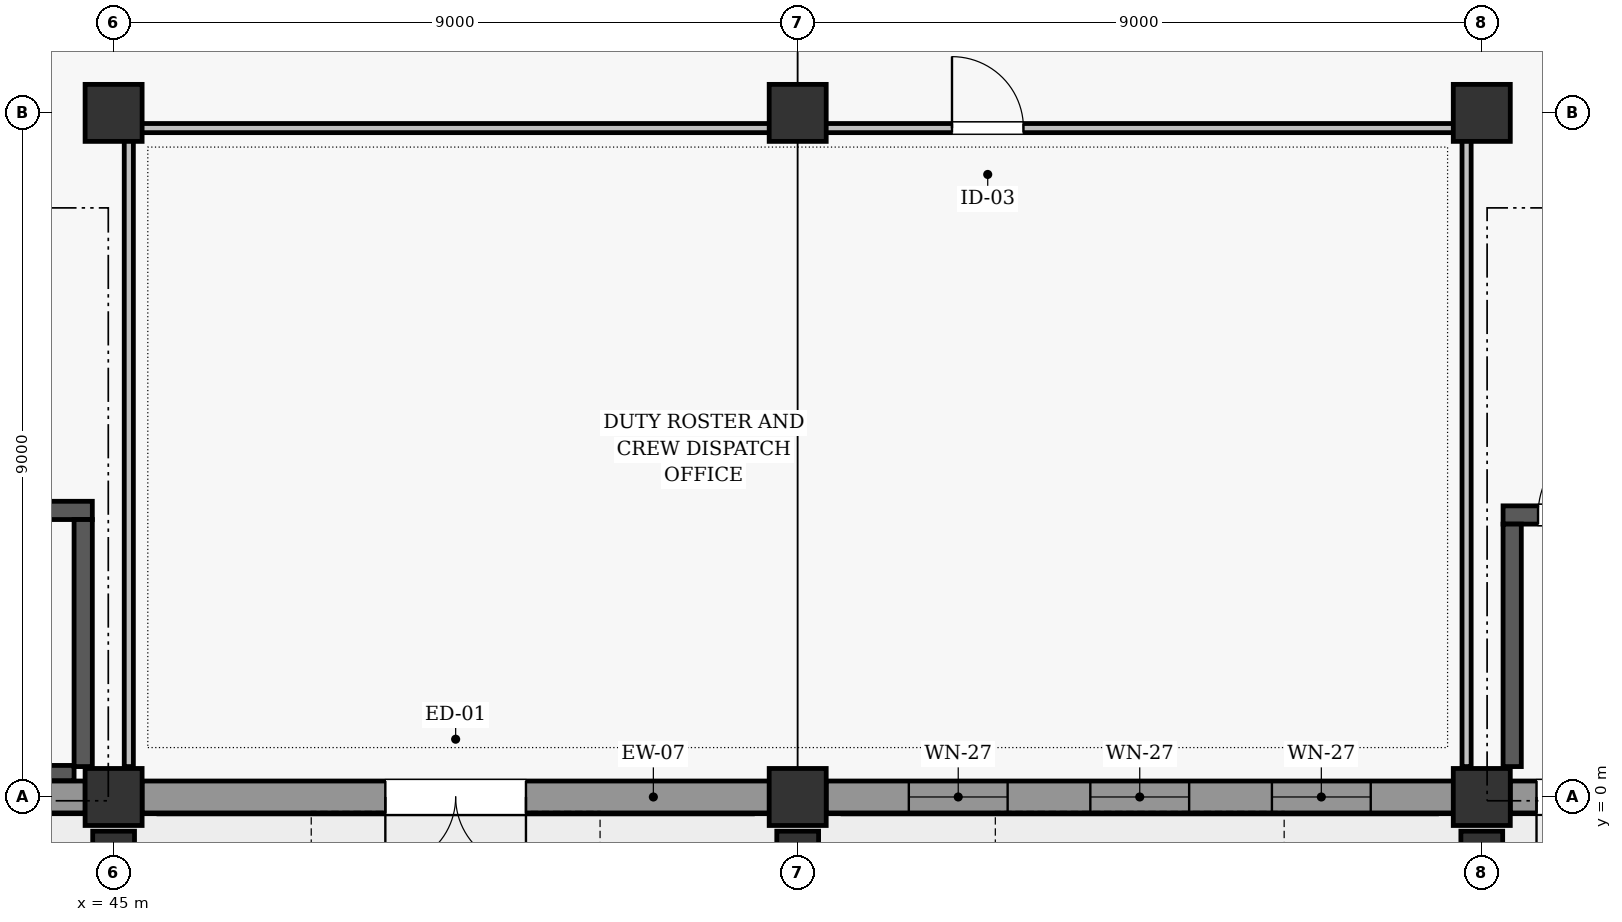
"""IFC4 building model, lengths in metres.
Left out: names, types, materials, properties, quantities, classifications, styles, units other than length and angle.
Written with IfcOpenShell. Run it as: python <this file> out.ifc"""

import sys

from ifc_helpers import new_model, si_unit, direction, frame, frame_2d, origin, origin_2d, place, context, subcontext, project, spatial, rectangle, extrude, element, fill, save


model = new_model("IFC4")
c1 = context("Model", 3, precision=1e-05, world=origin(), true_north=direction((0.0, 1.0)))
c2 = subcontext(c1, "Body", "Model", "MODEL_VIEW")
j1 = project(units=[si_unit("LENGTHUNIT", "METRE"), si_unit("PLANEANGLEUNIT", "RADIAN")], contexts=[c1])
p1 = place(None, origin())
s1 = spatial("IfcSite", under=j1, at=p1, CompositionType="ELEMENT")
p2 = place(p1, origin())
s2 = spatial("IfcBuilding", under=s1, at=p2, CompositionType="ELEMENT")
p3 = place(p2, origin())
s3 = spatial("IfcBuildingStorey", under=s2, at=p3, CompositionType="ELEMENT", Elevation=0.0)
for number, where, z_axis, x_axis in (
    (1, (45.0, 0.0, 0.0), (0.0, 0.0, 1.0), (1.0, 0.0, 0.0)),
    (2, (45.0, 9.0, 0.0), (0.0, 0.0, 1.0), (1.0, 0.0, 0.0)),
    (3, (54.0, 0.0, 0.0), (0.0, 0.0, 1.0), (1.0, 0.0, 0.0)),
    (4, (54.0, 9.0, 0.0), (0.0, 0.0, 1.0), (1.0, 0.0, 0.0)),
    (5, (63.0, 0.0, 0.0), (0.0, 0.0, 1.0), (1.0, 0.0, 0.0)),
    (6, (63.0, 9.0, 0.0), (0.0, 0.0, 1.0), (1.0, 0.0, 0.0)),
):
    element("IfcColumn", number, at=place(p3, frame(where, z_axis=z_axis, x_axis=x_axis)), inside=s3, PredefinedType="COLUMN", context=c2, shape_type="SweptSolid", body=[
        extrude(rectangle(XDim=0.75, YDim=0.75, at=origin_2d()), origin(), (0.0, 0.0, 1.0), 4.8),
    ])
for number, where, z_axis, x_axis in (
    (7, (45.0, -0.85, 0.0), (0.0, 0.0, 1.0), (1.0, 0.0, 0.0)),
    (8, (54.0, -0.85, 0.0), (0.0, 0.0, 1.0), (1.0, 0.0, 0.0)),
    (9, (63.0, -0.85, 0.0), (0.0, 0.0, 1.0), (1.0, 0.0, 0.0)),
):
    element("IfcColumn", number, at=place(p3, frame(where, z_axis=z_axis, x_axis=x_axis)), inside=s3, PredefinedType="PILASTER", context=c2, shape_type="SweptSolid", body=[
        extrude(rectangle(XDim=0.55, YDim=0.8, at=origin_2d()), origin(), (0.0, 0.0, 1.0), 4.8),
    ])
p4 = place(p3, frame((36.373, 0.0, 0.0), z_axis=(0.0, 0.0, 1.0), x_axis=(1.0, 0.0, 0.0)))
e10 = element("IfcWall", 10, at=p4, inside=s3, PredefinedType="SOLIDWALL", context=c2, shape_type="SweptSolid", body=[
    extrude(rectangle(XDim=8.254, YDim=0.42, at=frame_2d((4.127, 0.0))), origin(), (0.0, 0.0, 1.0), 3.842),
])
p5 = place(p4, frame((0.327, 0.0, 0.0)))
e11 = element("IfcOpeningElement", 11, at=p5, cuts=e10, PredefinedType="OPENING", context=c2, shape_type="SweptSolid", body=[
    extrude(rectangle(XDim=1.2, YDim=2.18, at=frame_2d((0.6, 1.09))), frame((0.0, 0.22, 0.0), z_axis=(0.0, -1.0, 0.0), x_axis=(1.0, 0.0, 0.0)), (0.0, 0.0, 1.0), 0.44),
])
p6 = place(p3, frame((45.373, 0.0, 0.0), z_axis=(0.0, 0.0, 1.0), x_axis=(1.0, 0.0, 0.0)))
e12 = element("IfcWall", 12, at=p6, inside=s3, PredefinedType="SOLIDWALL", context=c2, shape_type="SweptSolid", body=[
    extrude(rectangle(XDim=8.254, YDim=0.42, at=frame_2d((4.127, 0.0))), origin(), (0.0, 0.0, 1.0), 3.842),
])
p7 = place(p6, frame((3.202, 0.0, 0.0)))
e13 = element("IfcOpeningElement", 13, at=p7, cuts=e12, PredefinedType="OPENING", context=c2, shape_type="SweptSolid", body=[
    extrude(rectangle(XDim=1.85, YDim=2.35, at=frame_2d((0.925, 1.175))), frame((0.0, 0.22, 0.0), z_axis=(0.0, -1.0, 0.0), x_axis=(1.0, 0.0, 0.0)), (0.0, 0.0, 1.0), 0.44),
])
p8 = place(p3, frame((54.373, 0.0, 0.0), z_axis=(0.0, 0.0, 1.0), x_axis=(1.0, 0.0, 0.0)))
e14 = element("IfcWall", 14, at=p8, inside=s3, PredefinedType="SOLIDWALL", context=c2, shape_type="SweptSolid", body=[
    extrude(rectangle(XDim=8.254, YDim=0.42, at=frame_2d((4.127, 0.0))), origin(), (0.0, 0.0, 1.0), 3.842),
])
p9 = place(p8, frame((1.089, 0.0, 0.8)))
e15 = element("IfcOpeningElement", 15, at=p9, cuts=e14, PredefinedType="OPENING", context=c2, shape_type="SweptSolid", body=[
    extrude(rectangle(XDim=1.3, YDim=2.3, at=frame_2d((0.65, 1.15))), frame((0.0, 0.22, 0.0), z_axis=(0.0, -1.0, 0.0), x_axis=(1.0, 0.0, 0.0)), (0.0, 0.0, 1.0), 0.44),
])
p10 = place(p8, frame((3.477, 0.0, 0.8)))
e16 = element("IfcOpeningElement", 16, at=p10, cuts=e14, PredefinedType="OPENING", context=c2, shape_type="SweptSolid", body=[
    extrude(rectangle(XDim=1.3, YDim=2.3, at=frame_2d((0.65, 1.15))), frame((0.0, 0.22, 0.0), z_axis=(0.0, -1.0, 0.0), x_axis=(1.0, 0.0, 0.0)), (0.0, 0.0, 1.0), 0.44),
])
p11 = place(p8, frame((5.866, 0.0, 0.8)))
e17 = element("IfcOpeningElement", 17, at=p11, cuts=e14, PredefinedType="OPENING", context=c2, shape_type="SweptSolid", body=[
    extrude(rectangle(XDim=1.3, YDim=2.3, at=frame_2d((0.65, 1.15))), frame((0.0, 0.22, 0.0), z_axis=(0.0, -1.0, 0.0), x_axis=(1.0, 0.0, 0.0)), (0.0, 0.0, 1.0), 0.44),
])
p12 = place(p3, frame((63.373, 0.0, 0.0), z_axis=(0.0, 0.0, 1.0), x_axis=(1.0, 0.0, 0.0)))
e18 = element("IfcWall", 18, at=p12, inside=s3, PredefinedType="SOLIDWALL", context=c2, shape_type="SweptSolid", body=[
    extrude(rectangle(XDim=8.254, YDim=0.42, at=frame_2d((4.127, 0.0))), origin(), (0.0, 0.0, 1.0), 3.842),
])
p13 = place(p12, frame((0.347, 0.0, 0.0)))
e19 = element("IfcOpeningElement", 19, at=p13, cuts=e18, PredefinedType="OPENING", context=c2, shape_type="SweptSolid", body=[
    extrude(rectangle(XDim=1.12, YDim=2.14, at=frame_2d((0.56, 1.07))), frame((0.0, 0.22, 0.0), z_axis=(0.0, -1.0, 0.0), x_axis=(1.0, 0.0, 0.0)), (0.0, 0.0, 1.0), 0.44),
])
p14 = place(p3, frame((38.07, 0.315, 0.0), z_axis=(0.0, 0.0, 1.0), x_axis=(1.0, 0.0, 0.0)))
e20 = element("IfcWall", 20, at=p14, inside=s3, PredefinedType="SHEAR", context=c2, shape_type="SweptSolid", body=[
    extrude(rectangle(XDim=6.41, YDim=0.2, at=frame_2d((3.205, 0.0))), origin(), (0.0, 0.0, 1.0), 4.55),
])
p15 = place(p3, frame((36.28, 3.77, 0.0), z_axis=(0.0, 0.0, 1.0), x_axis=(1.0, 0.0, 0.0)))
e21 = element("IfcWall", 21, at=p15, inside=s3, PredefinedType="SHEAR", context=c2, shape_type="SweptSolid", body=[
    extrude(rectangle(XDim=8.44, YDim=0.24, at=frame_2d((4.22, 0.0))), origin(), (0.0, 0.0, 1.0), 4.55),
])
p16 = place(p15, frame((0.48, 0.0, 0.0)))
e22 = element("IfcOpeningElement", 22, at=p16, cuts=e21, PredefinedType="OPENING", context=c2, shape_type="SweptSolid", body=[
    extrude(rectangle(XDim=1.08, YDim=2.08, at=frame_2d((0.54, 1.04))), frame((0.0, 0.13, 0.0), z_axis=(0.0, -1.0, 0.0), x_axis=(1.0, 0.0, 0.0)), (0.0, 0.0, 1.0), 0.26),
])
p17 = place(p3, frame((44.6, 0.4, 0.0), z_axis=(0.0, 0.0, 1.0), x_axis=(0.0, 1.0, 0.0)))
e23 = element("IfcWall", 23, at=p17, inside=s3, PredefinedType="SHEAR", context=c2, shape_type="SweptSolid", body=[
    extrude(rectangle(XDim=3.25, YDim=0.24, at=frame_2d((1.625, 0.0))), origin(), (0.0, 0.0, 1.0), 4.55),
])
p18 = place(p3, frame((63.28, 3.71, 0.0), z_axis=(0.0, 0.0, 1.0), x_axis=(1.0, 0.0, 0.0)))
e24 = element("IfcWall", 24, at=p18, inside=s3, PredefinedType="SHEAR", context=c2, shape_type="SweptSolid", body=[
    extrude(rectangle(XDim=8.44, YDim=0.24, at=frame_2d((4.22, 0.0))), origin(), (0.0, 0.0, 1.0), 4.55),
])
p19 = place(p18, frame((0.46, 0.0, 0.0)))
e25 = element("IfcOpeningElement", 25, at=p19, cuts=e24, PredefinedType="OPENING", context=c2, shape_type="SweptSolid", body=[
    extrude(rectangle(XDim=1.08, YDim=2.08, at=frame_2d((0.54, 1.04))), frame((0.0, 0.13, 0.0), z_axis=(0.0, -1.0, 0.0), x_axis=(1.0, 0.0, 0.0)), (0.0, 0.0, 1.0), 0.26),
])
p20 = place(p3, frame((63.4, 0.4, 0.0), z_axis=(0.0, 0.0, 1.0), x_axis=(0.0, 1.0, 0.0)))
e26 = element("IfcWall", 26, at=p20, inside=s3, PredefinedType="SHEAR", context=c2, shape_type="SweptSolid", body=[
    extrude(rectangle(XDim=3.19, YDim=0.24, at=frame_2d((1.595, 0.0))), origin(), (0.0, 0.0, 1.0), 4.55),
])
p21 = place(p3, frame((45.2, 8.8, 0.0), z_axis=(0.0, 0.0, 1.0), x_axis=(1.0, 0.0, 0.0)))
e27 = element("IfcWall", 27, at=p21, inside=s3, PredefinedType="PARTITIONING", context=c2, shape_type="SweptSolid", body=[
    extrude(rectangle(XDim=17.6, YDim=0.12, at=frame_2d((8.8, 0.0))), origin(), (0.0, 0.0, 1.0), 3.795),
])
p22 = place(p21, frame((10.83, 0.0, 0.0)))
e28 = element("IfcOpeningElement", 28, at=p22, cuts=e27, PredefinedType="OPENING", context=c2, shape_type="SweptSolid", body=[
    extrude(rectangle(XDim=0.94, YDim=2.06, at=frame_2d((0.47, 1.03))), frame((0.0, 0.07, 0.0), z_axis=(0.0, -1.0, 0.0), x_axis=(1.0, 0.0, 0.0)), (0.0, 0.0, 1.0), 0.14),
])
for number, where, z_axis, x_axis in (
    (29, (45.2, 0.4, 0.0), (0.0, 0.0, 1.0), (0.0, 1.0, 0.0)),
    (30, (62.8, 0.4, 0.0), (0.0, 0.0, 1.0), (0.0, 1.0, 0.0)),
):
    element("IfcWall", number, at=place(p3, frame(where, z_axis=z_axis, x_axis=x_axis)), inside=s3, PredefinedType="PARTITIONING", context=c2, shape_type="SweptSolid", body=[
        extrude(rectangle(XDim=8.4, YDim=0.12, at=frame_2d((4.2, 0.0))), origin(), (0.0, 0.0, 1.0), 3.895),
    ])
p23 = place(p7, frame((1.85, 0.0, 0.0), z_axis=(0.0, 0.0, 1.0), x_axis=(-1.0, 0.0, 0.0)))
e31 = element("IfcDoor", 31, at=p23, inside=s3, OperationType="DOUBLE_SWING_LEFT", PredefinedType="DOOR", context=c2, shape_type="SweptSolid", body=[
    extrude(rectangle(XDim=1.85, YDim=2.35, at=frame_2d((0.925, 1.175))), frame((0.0, 0.025, 0.0), z_axis=(0.0, -1.0, 0.0), x_axis=(1.0, 0.0, 0.0)), (0.0, 0.0, 1.0), 0.05),
])
fill(e13, e31)
p24 = place(p9, origin())
e32 = element("IfcWindow", 32, at=p24, inside=s3, PartitioningType="SINGLE_PANEL", PredefinedType="WINDOW", context=c2, shape_type="SweptSolid", body=[
    extrude(rectangle(XDim=1.3, YDim=2.3, at=frame_2d((0.65, 1.15))), frame((0.0, 0.03, 0.0), z_axis=(0.0, -1.0, 0.0), x_axis=(1.0, 0.0, 0.0)), (0.0, 0.0, 1.0), 0.06),
])
fill(e15, e32)
p25 = place(p10, origin())
e33 = element("IfcWindow", 33, at=p25, inside=s3, PartitioningType="SINGLE_PANEL", PredefinedType="WINDOW", context=c2, shape_type="SweptSolid", body=[
    extrude(rectangle(XDim=1.3, YDim=2.3, at=frame_2d((0.65, 1.15))), frame((0.0, 0.03, 0.0), z_axis=(0.0, -1.0, 0.0), x_axis=(1.0, 0.0, 0.0)), (0.0, 0.0, 1.0), 0.06),
])
fill(e16, e33)
p26 = place(p11, origin())
e34 = element("IfcWindow", 34, at=p26, inside=s3, PartitioningType="SINGLE_PANEL", PredefinedType="WINDOW", context=c2, shape_type="SweptSolid", body=[
    extrude(rectangle(XDim=1.3, YDim=2.3, at=frame_2d((0.65, 1.15))), frame((0.0, 0.03, 0.0), z_axis=(0.0, -1.0, 0.0), x_axis=(1.0, 0.0, 0.0)), (0.0, 0.0, 1.0), 0.06),
])
fill(e17, e34)
p27 = place(p13, frame((1.12, 0.0, 0.0), z_axis=(0.0, 0.0, 1.0), x_axis=(-1.0, 0.0, 0.0)))
e35 = element("IfcDoor", 35, at=p27, inside=s3, OperationType="SINGLE_SWING_LEFT", PredefinedType="DOOR", context=c2, shape_type="SweptSolid", body=[
    extrude(rectangle(XDim=1.12, YDim=2.14, at=frame_2d((0.56, 1.07))), frame((0.0, 0.025, 0.0), z_axis=(0.0, -1.0, 0.0), x_axis=(1.0, 0.0, 0.0)), (0.0, 0.0, 1.0), 0.05),
])
fill(e19, e35)
p28 = place(p19, origin())
e36 = element("IfcDoor", 36, at=p28, inside=s3, OperationType="SINGLE_SWING_RIGHT", PredefinedType="DOOR", context=c2, shape_type="SweptSolid", body=[
    extrude(rectangle(XDim=1.08, YDim=2.08, at=frame_2d((0.54, 1.04))), frame((0.0, 0.025, 0.0), z_axis=(0.0, -1.0, 0.0), x_axis=(1.0, 0.0, 0.0)), (0.0, 0.0, 1.0), 0.05),
])
fill(e25, e36)
p29 = place(p22, origin())
e37 = element("IfcDoor", 37, at=p29, inside=s3, OperationType="SINGLE_SWING_LEFT", PredefinedType="DOOR", context=c2, shape_type="SweptSolid", body=[
    extrude(rectangle(XDim=0.94, YDim=2.06, at=frame_2d((0.47, 1.03))), frame((0.0, 0.025, 0.0), z_axis=(0.0, -1.0, 0.0), x_axis=(1.0, 0.0, 0.0)), (0.0, 0.0, 1.0), 0.05),
])
fill(e28, e37)
save(model, sys.argv[1])
